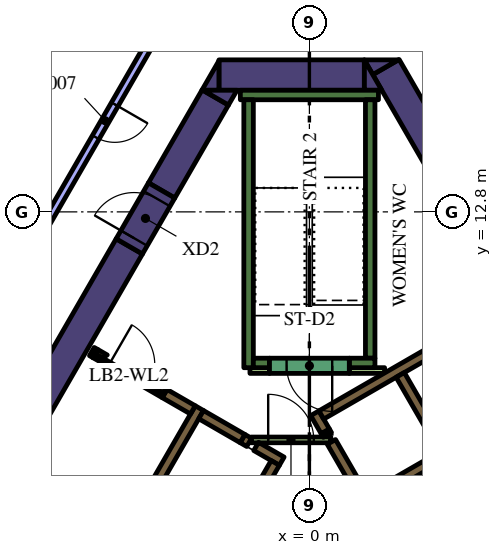
"""IFC4 building model, lengths in metres.
Left out: names, types, materials, properties, quantities, classifications, styles, units other than length and angle.
Written with IfcOpenShell. Run it as: python <this file> out.ifc"""

import sys

from ifc_helpers import new_model, si_unit, direction, frame, frame_2d, origin, place, context, subcontext, project, spatial, polyline, rectangle, outline, extrude, element, fill, save


model = new_model("IFC4")
c1 = context("Model", 3, precision=1e-05, world=origin(), true_north=direction((0.0, 1.0)))
c2 = subcontext(c1, "Body", "Model", "MODEL_VIEW")
j1 = project(units=[si_unit("LENGTHUNIT", "METRE"), si_unit("PLANEANGLEUNIT", "RADIAN")], contexts=[c1])
p1 = place(None, origin())
s1 = spatial("IfcSite", under=j1, at=p1, CompositionType="ELEMENT")
p2 = place(p1, origin())
s2 = spatial("IfcBuilding", under=s1, at=p2, CompositionType="ELEMENT")
p3 = place(p2, frame((0.0, 0.0, 179.4)))
s3 = spatial("IfcBuildingStorey", under=s2, at=p3, CompositionType="ELEMENT", Elevation=179.4)
p4 = place(p3, frame((5.549, 10.489, 0.0), z_axis=(0.0, 0.0, 1.0), x_axis=(-0.50001746176, 0.866015321998, 0.0)))
e1 = element("IfcWall", 1, at=p4, inside=s3, PredefinedType="SOLIDWALL", context=c2, shape_type="SweptSolid", body=[
    extrude(rectangle(XDim=7.068, YDim=0.8, at=frame_2d((3.534, 0.0))), origin(), (0.0, 0.0, 1.0), 4.2),
])
p5 = place(p3, origin())
e2 = element("IfcWall", 2, at=p5, inside=s3, PredefinedType="SOLIDWALL", context=c2, shape_type="SweptSolid", body=[
    extrude(outline(polyline([(1.443, 16.8), (2.339, 16.8), (1.667, 16.412), (1.443, 16.8)])), origin(), (0.0, 0.0, 1.0), 4.2),
])
p6 = place(p3, frame((-2.379, 16.4, 0.0), z_axis=(0.0, 0.0, 1.0), x_axis=(1.0, 0.0, 0.0)))
e3 = element("IfcWall", 3, at=p6, inside=s3, PredefinedType="SOLIDWALL", context=c2, shape_type="SweptSolid", body=[
    extrude(rectangle(XDim=3.824, YDim=0.8, at=frame_2d((1.912, 0.0))), origin(), (0.0, 0.0, 1.0), 4.2),
])
e4 = element("IfcWall", 4, at=p5, inside=s3, PredefinedType="SOLIDWALL", context=c2, shape_type="SweptSolid", body=[
    extrude(outline(polyline([(1.905, 16.0), (1.447, 16.0), (1.447, 16.793), (1.905, 16.0)])), origin(), (0.0, 0.0, 1.0), 4.2),
])
e5 = element("IfcWall", 5, at=p5, inside=s3, PredefinedType="SOLIDWALL", context=c2, shape_type="SweptSolid", body=[
    extrude(outline(polyline([(-2.829, 16.0), (-2.381, 16.776), (-2.381, 16.0), (-2.829, 16.0)])), origin(), (0.0, 0.0, 1.0), 4.2),
])
p7 = place(p3, frame((-2.477, 15.81, 0.0), z_axis=(0.0, 0.0, 1.0), x_axis=(-0.499969377405, -0.866043083026, 0.0)))
e6 = element("IfcWall", 6, at=p7, inside=s3, PredefinedType="SOLIDWALL", context=c2, shape_type="SweptSolid", body=[
    extrude(rectangle(XDim=2.824, YDim=0.8, at=frame_2d((1.412, 0.0))), origin(), (0.0, 0.0, 1.0), 4.2),
])
e7 = element("IfcWall", 7, at=p5, inside=s3, PredefinedType="SOLIDWALL", context=c2, shape_type="SweptSolid", body=[
    extrude(outline(polyline([(-1.905, 16.0), (-2.129, 15.612), (-2.801, 16.0), (-1.905, 16.0)])), origin(), (0.0, 0.0, 1.0), 4.2),
])
p8 = place(p3, frame((-12.668, -1.842, 0.0), z_axis=(0.0, 0.0, 1.0), x_axis=(0.500003640647, 0.866023301845, 0.0)))
e8 = element("IfcWall", 8, at=p8, inside=s3, PredefinedType="SOLIDWALL", context=c2, shape_type="SweptSolid", body=[
    extrude(rectangle(XDim=15.858, YDim=0.8, at=frame_2d((7.929, 0.0))), origin(), (0.0, 0.0, 1.0), 4.2),
])
p9 = place(p3, frame((-1.817, 15.875, 0.0), z_axis=(0.0, 0.0, 1.0), x_axis=(1.0, 0.0, 0.0)))
e9 = element("IfcWall", 9, at=p9, inside=s3, PredefinedType="SOLIDWALL", context=c2, shape_type="SweptSolid", body=[
    extrude(rectangle(XDim=3.634, YDim=0.25, at=frame_2d((1.817, 0.0))), origin(), (0.0, 0.0, 1.0), 4.2),
])
p10 = place(p3, frame((1.6, 8.95, 0.0), z_axis=(0.0, 0.0, 1.0), x_axis=(0.0, 1.0, 0.0)))
e10 = element("IfcWall", 10, at=p10, inside=s3, PredefinedType="SOLIDWALL", context=c2, shape_type="SweptSolid", body=[
    extrude(rectangle(XDim=6.8, YDim=0.25, at=frame_2d((3.4, 0.0))), origin(), (0.0, 0.0, 1.0), 4.2),
])
p11 = place(p3, frame((1.05, 8.825, 0.0), z_axis=(0.0, 0.0, 1.0), x_axis=(1.0, 0.0, 0.0)))
e11 = element("IfcWall", 11, at=p11, inside=s3, PredefinedType="SOLIDWALL", context=c2, shape_type="SweptSolid", body=[
    extrude(rectangle(XDim=0.675, YDim=0.25, at=frame_2d((0.337, 0.0))), origin(), (0.0, 0.0, 1.0), 4.2),
])
p12 = place(p3, frame((-1.6, 8.7, 0.0), z_axis=(0.0, 0.0, 1.0), x_axis=(0.0, 1.0, 0.0)))
e12 = element("IfcWall", 12, at=p12, inside=s3, PredefinedType="SOLIDWALL", context=c2, shape_type="SweptSolid", body=[
    extrude(rectangle(XDim=7.05, YDim=0.25, at=frame_2d((3.525, 0.0))), origin(), (0.0, 0.0, 1.0), 4.2),
])
p13 = place(p3, frame((-1.475, 8.825, 0.0), z_axis=(0.0, 0.0, 1.0), x_axis=(1.0, 0.0, 0.0)))
e13 = element("IfcWall", 13, at=p13, inside=s3, PredefinedType="SOLIDWALL", context=c2, shape_type="SweptSolid", body=[
    extrude(rectangle(XDim=0.425, YDim=0.25, at=frame_2d((0.212, 0.0))), origin(), (0.0, 0.0, 1.0), 4.2),
])
p14 = place(p3, frame((0.473, 6.93, 0.0), z_axis=(0.0, 0.0, 1.0), x_axis=(-0.49972245349, 0.866185586049, 0.0)))
e14 = element("IfcWall", 14, at=p14, inside=s3, PredefinedType="SOLIDWALL", context=c2, shape_type="SweptSolid", body=[
    extrude(rectangle(XDim=0.11, YDim=0.25, at=frame_2d((0.055, 0.0))), origin(), (0.0, 0.0, 1.0), 4.2),
])
p15 = place(p3, frame((6.568, -3.627, 0.0), z_axis=(0.0, 0.0, 1.0), x_axis=(-0.499999455981, 0.866025717874, 0.0)))
e15 = element("IfcWall", 15, at=p15, inside=s3, PredefinedType="SOLIDWALL", context=c2, shape_type="SweptSolid", body=[
    extrude(rectangle(XDim=11.978, YDim=0.25, at=frame_2d((5.989, 0.0))), origin(), (0.0, 0.0, 1.0), 4.2),
])
p16 = place(p3, frame((0.417, 7.027, 0.0), z_axis=(0.0, 0.0, 1.0), x_axis=(-0.500210807569, 0.865903659763, 0.0)))
e16 = element("IfcWall", 16, at=p16, inside=s3, PredefinedType="SOLIDWALL", context=c2, shape_type="SweptSolid", body=[
    extrude(rectangle(XDim=0.548, YDim=0.25, at=frame_2d((0.274, 0.0))), origin(), (0.0, 0.0, 1.0), 4.2),
])
p17 = place(p3, frame((3.647, 9.38, 0.0), z_axis=(0.0, 0.0, 1.0), x_axis=(-0.866025015791, -0.500000672024, 0.0)))
e17 = element("IfcWall", 17, at=p17, inside=s3, PredefinedType="SOLIDWALL", context=c2, shape_type="SweptSolid", body=[
    extrude(rectangle(XDim=3.849, YDim=0.25, at=frame_2d((1.924, 0.0))), origin(), (0.0, 0.0, 1.0), 4.2),
])
p18 = place(p3, frame((1.574, 5.274, 0.0), z_axis=(0.0, 0.0, 1.0), x_axis=(0.866028486751, 0.499994660107, 0.0)))
e18 = element("IfcWall", 18, at=p18, inside=s3, PredefinedType="SOLIDWALL", context=c2, shape_type="SweptSolid", body=[
    extrude(rectangle(XDim=2.2, YDim=0.25, at=frame_2d((1.1, 0.0))), origin(), (0.0, 0.0, 1.0), 4.2),
])
p19 = place(p3, frame((-8.06, -1.311, 0.0), z_axis=(0.0, 0.0, 1.0), x_axis=(0.50000273126, 0.866023826885, 0.0)))
e19 = element("IfcWall", 19, at=p19, inside=s3, PredefinedType="SOLIDWALL", context=c2, shape_type="SweptSolid", body=[
    extrude(rectangle(XDim=10.33, YDim=0.25, at=frame_2d((5.165, 0.0))), origin(), (0.0, 0.0, 1.0), 4.2),
])
p20 = place(p3, frame((-1.758, 6.835, 0.0), z_axis=(0.0, 0.0, 1.0), x_axis=(0.865982457891, -0.500074377092, 0.0)))
e20 = element("IfcWall", 20, at=p20, inside=s3, PredefinedType="SOLIDWALL", context=c2, shape_type="SweptSolid", body=[
    extrude(rectangle(XDim=0.2, YDim=0.25, at=frame_2d((0.1, 0.0))), origin(), (0.0, 0.0, 1.0), 4.2),
])
p21 = place(p3, frame((-1.76, 6.836, 0.0), z_axis=(0.0, 0.0, 1.0), x_axis=(-0.865952863304, 0.500125622755, 0.0)))
e21 = element("IfcWall", 21, at=p21, inside=s3, PredefinedType="SOLIDWALL", context=c2, shape_type="SweptSolid", body=[
    extrude(rectangle(XDim=1.258, YDim=0.25, at=frame_2d((0.629, 0.0))), origin(), (0.0, 0.0, 1.0), 4.2),
])
p22 = place(p3, frame((-0.728, 6.24, 0.0), z_axis=(0.0, 0.0, 1.0), x_axis=(-0.865955664968, 0.500120771724, 0.0)))
e22 = element("IfcWall", 22, at=p22, inside=s3, PredefinedType="SOLIDWALL", context=c2, shape_type="SweptSolid", body=[
    extrude(rectangle(XDim=0.778, YDim=0.25, at=frame_2d((0.389, 0.0))), origin(), (0.0, 0.0, 1.0), 4.2),
])
p23 = place(p3, frame((-5.725, 9.125, 0.0), z_axis=(0.0, 0.0, 1.0), x_axis=(0.866185586049, -0.49972245349, 0.0)))
e23 = element("IfcWall", 23, at=p23, inside=s3, PredefinedType="SOLIDWALL", context=c2, shape_type="SweptSolid", body=[
    extrude(rectangle(XDim=0.11, YDim=0.25, at=frame_2d((0.055, 0.0))), origin(), (0.0, 0.0, 1.0), 4.2),
])
p24 = place(p3, frame((-3.066, 7.59, 0.0), z_axis=(0.0, 0.0, 1.0), x_axis=(-0.866081358704, 0.49990307071, 0.0)))
e24 = element("IfcWall", 24, at=p24, inside=s3, PredefinedType="SOLIDWALL", context=c2, shape_type="SweptSolid", body=[
    extrude(rectangle(XDim=0.858, YDim=0.25, at=frame_2d((0.429, 0.0))), origin(), (0.0, 0.0, 1.0), 4.2),
])
e25 = element("IfcWall", 25, at=p5, inside=s3, PredefinedType="SOLIDWALL", context=c2, shape_type="SweptSolid", body=[
    extrude(outline(polyline([(-3.748, 8.128), (-3.813, 8.015), (-4.027, 8.139), (-4.017, 8.156), (-4.008, 8.173), (-4.0, 8.192), (-3.995, 8.21), (-3.991, 8.23), (-3.99, 8.25), (-3.99, 8.268), (-3.748, 8.128)])), origin(), (0.0, 0.0, 1.0), 4.2),
])
e26 = element("IfcWall", 26, at=p5, inside=s3, PredefinedType="SOLIDWALL", context=c2, shape_type="SweptSolid", body=[
    extrude(outline(polyline([(-5.689, 8.96), (-5.69, 8.961), (-5.565, 9.177), (-5.319, 9.035), (-5.335, 9.026), (-5.351, 9.015), (-5.366, 9.002), (-5.379, 8.988), (-5.392, 8.972), (-5.402, 8.956), (-5.412, 8.939), (-5.629, 9.064), (-5.629, 9.064), (-5.689, 8.96)])), origin(), (0.0, 0.0, 1.0), 4.2),
])
p25 = place(p3, frame((1.05, 8.625, 0.0), z_axis=(0.0, 0.0, 1.0), x_axis=(1.0, 0.0, 0.0)))
e27 = element("IfcWall", 27, at=p25, inside=s3, PredefinedType="PARTITIONING", context=c2, shape_type="SweptSolid", body=[
    extrude(rectangle(XDim=0.929, YDim=0.15, at=frame_2d((0.464, 0.0))), origin(), (0.0, 0.0, 1.0), 3.15),
])
p26 = place(p3, frame((-1.564, 8.625, 0.0), z_axis=(0.0, 0.0, 1.0), x_axis=(1.0, 0.0, 0.0)))
e28 = element("IfcWall", 28, at=p26, inside=s3, PredefinedType="PARTITIONING", context=c2, shape_type="SweptSolid", body=[
    extrude(rectangle(XDim=0.514, YDim=0.15, at=frame_2d((0.257, 0.0))), origin(), (0.0, 0.0, 1.0), 3.15),
])
p27 = place(p3, frame((8.565, -2.185, 0.0), z_axis=(0.0, 0.0, 1.0), x_axis=(-0.499997954832, 0.866026584559, 0.0)))
e29 = element("IfcWall", 29, at=p27, inside=s3, PredefinedType="SOLIDWALL", context=c2, shape_type="SweptSolid", body=[
    extrude(rectangle(XDim=12.35, YDim=0.25, at=frame_2d((6.175, 0.0))), origin(), (0.0, 0.0, 1.0), 4.2),
])
p28 = place(p27, frame((0.585, 0.0, 0.0)))
e30 = element("IfcOpeningElement", 30, at=p28, cuts=e29, PredefinedType="OPENING", context=c2, shape_type="SweptSolid", body=[
    extrude(rectangle(XDim=1.1, YDim=2.1, at=frame_2d((0.55, 1.05))), frame((0.0, 0.135, 0.0), z_axis=(0.0, -1.0, 0.0), x_axis=(1.0, 0.0, 0.0)), (0.0, 0.0, 1.0), 0.27),
])
p29 = place(p3, frame((-0.898, 6.194, 0.0), z_axis=(0.0, 0.0, 1.0), x_axis=(-0.499996202215, -0.866027596426, 0.0)))
e31 = element("IfcWall", 31, at=p29, inside=s3, PredefinedType="SOLIDWALL", context=c2, shape_type="SweptSolid", body=[
    extrude(rectangle(XDim=9.83, YDim=0.25, at=frame_2d((4.915, 0.0))), origin(), (0.0, 0.0, 1.0), 4.2),
])
p30 = place(p29, frame((0.585, 0.0, 0.0)))
e32 = element("IfcOpeningElement", 32, at=p30, cuts=e31, PredefinedType="OPENING", context=c2, shape_type="SweptSolid", body=[
    extrude(rectangle(XDim=1.1, YDim=2.1, at=frame_2d((0.55, 1.05))), frame((0.0, 0.135, 0.0), z_axis=(0.0, -1.0, 0.0), x_axis=(1.0, 0.0, 0.0)), (0.0, 0.0, 1.0), 0.27),
])
p31 = place(p29, frame((3.105, 0.0, 0.0)))
e33 = element("IfcOpeningElement", 33, at=p31, cuts=e31, PredefinedType="OPENING", context=c2, shape_type="SweptSolid", body=[
    extrude(rectangle(XDim=1.1, YDim=2.1, at=frame_2d((0.55, 1.05))), frame((0.0, 0.135, 0.0), z_axis=(0.0, -1.0, 0.0), x_axis=(1.0, 0.0, 0.0)), (0.0, 0.0, 1.0), 0.27),
])
p32 = place(p29, frame((5.625, 0.0, 0.0)))
e34 = element("IfcOpeningElement", 34, at=p32, cuts=e31, PredefinedType="OPENING", context=c2, shape_type="SweptSolid", body=[
    extrude(rectangle(XDim=1.1, YDim=2.1, at=frame_2d((0.55, 1.05))), frame((0.0, 0.135, 0.0), z_axis=(0.0, -1.0, 0.0), x_axis=(1.0, 0.0, 0.0)), (0.0, 0.0, 1.0), 0.27),
])
p33 = place(p29, frame((8.145, 0.0, 0.0)))
e35 = element("IfcOpeningElement", 35, at=p33, cuts=e31, PredefinedType="OPENING", context=c2, shape_type="SweptSolid", body=[
    extrude(rectangle(XDim=1.1, YDim=2.1, at=frame_2d((0.55, 1.05))), frame((0.0, 0.135, 0.0), z_axis=(0.0, -1.0, 0.0), x_axis=(1.0, 0.0, 0.0)), (0.0, 0.0, 1.0), 0.27),
])
p34 = place(p3, frame((1.05, 8.75, 0.0), z_axis=(0.0, 0.0, 1.0), x_axis=(-1.0, 0.0, 0.0)))
e36 = element("IfcWall", 36, at=p34, inside=s3, PredefinedType="SOLIDWALL", context=c2, shape_type="SweptSolid", body=[
    extrude(rectangle(XDim=2.1, YDim=0.4, at=frame_2d((1.05, 0.0))), origin(), (0.0, 0.0, 1.0), 4.2),
])
p35 = place(p34, frame((0.45, 0.0, 0.0)))
e37 = element("IfcOpeningElement", 37, at=p35, cuts=e36, PredefinedType="OPENING", context=c2, shape_type="SweptSolid", body=[
    extrude(rectangle(XDim=1.2, YDim=2.1, at=frame_2d((0.6, 1.05))), frame((0.0, 0.21, 0.0), z_axis=(0.0, -1.0, 0.0), x_axis=(1.0, 0.0, 0.0)), (0.0, 0.0, 1.0), 0.42),
])
p36 = place(p3, frame((-1.534, 6.8, 0.0), z_axis=(0.0, 0.0, 1.0), x_axis=(1.0, 0.0, 0.0)))
e38 = element("IfcWall", 38, at=p36, inside=s3, PredefinedType="PARTITIONING", context=c2, shape_type="SweptSolid", body=[
    extrude(rectangle(XDim=2.1, YDim=0.15, at=frame_2d((1.05, 0.0))), origin(), (0.0, 0.0, 1.0), 3.15),
])
p37 = place(p36, frame((0.45, 0.0, 0.0)))
e39 = element("IfcOpeningElement", 39, at=p37, cuts=e38, PredefinedType="OPENING", context=c2, shape_type="SweptSolid", body=[
    extrude(rectangle(XDim=1.2, YDim=2.1, at=frame_2d((0.6, 1.05))), frame((0.0, 0.085, 0.0), z_axis=(0.0, -1.0, 0.0), x_axis=(1.0, 0.0, 0.0)), (0.0, 0.0, 1.0), 0.17),
])
p38 = place(p3, frame((-5.659, 9.012, 0.0), z_axis=(0.0, 0.0, 1.0), x_axis=(0.866009402589, -0.500027713859, 0.0)))
e40 = element("IfcWall", 40, at=p38, inside=s3, PredefinedType="PARTITIONING", context=c2, shape_type="SweptSolid", body=[
    extrude(rectangle(XDim=2.1, YDim=0.12, at=frame_2d((1.05, 0.0))), origin(), (0.0, 0.0, 1.0), 3.15),
])
p39 = place(p38, frame((0.45, 0.0, 0.0)))
e41 = element("IfcOpeningElement", 41, at=p39, cuts=e40, PredefinedType="OPENING", context=c2, shape_type="SweptSolid", body=[
    extrude(rectangle(XDim=1.2, YDim=2.1, at=frame_2d((0.6, 1.05))), frame((0.0, 0.07, 0.0), z_axis=(0.0, -1.0, 0.0), x_axis=(1.0, 0.0, 0.0)), (0.0, 0.0, 1.0), 0.14),
])
p40 = place(p3, frame((-4.739, 11.892, 0.0), z_axis=(0.0, 0.0, 1.0), x_axis=(0.500062241894, 0.865989465428, 0.0)))
e42 = element("IfcWall", 42, at=p40, inside=s3, PredefinedType="SOLIDWALL", context=c2, shape_type="SweptSolid", body=[
    extrude(rectangle(XDim=1.7, YDim=0.8, at=frame_2d((0.85, 0.0))), origin(), (0.0, 0.0, 1.0), 4.2),
])
p41 = place(p40, frame((0.25, 0.0, 0.0)))
e43 = element("IfcOpeningElement", 43, at=p41, cuts=e42, PredefinedType="OPENING", context=c2, shape_type="SweptSolid", body=[
    extrude(rectangle(XDim=1.2, YDim=2.1, at=frame_2d((0.6, 1.05))), frame((0.0, 0.41, 0.0), z_axis=(0.0, -1.0, 0.0), x_axis=(1.0, 0.0, 0.0)), (0.0, 0.0, 1.0), 0.82),
])
p42 = place(p3, frame((-3.421, 18.574, 0.0), z_axis=(0.0, 0.0, 1.0), x_axis=(-0.499989434416, -0.866031503741, 0.0)))
e44 = element("IfcWall", 44, at=p42, inside=s3, PredefinedType="PARTITIONING", context=c2, shape_type="SweptSolid", body=[
    extrude(rectangle(XDim=7.863, YDim=0.2, at=frame_2d((3.932, 0.0))), origin(), (0.0, 0.0, 1.0), 3.15),
])
p43 = place(p42, frame((3.4, 0.0, 0.0)))
e45 = element("IfcOpeningElement", 45, at=p43, cuts=e44, PredefinedType="OPENING", context=c2, shape_type="SweptSolid", body=[
    extrude(rectangle(XDim=1.0, YDim=2.1, at=frame_2d((0.5, 1.05))), frame((0.0, 0.11, 0.0), z_axis=(0.0, -1.0, 0.0), x_axis=(1.0, 0.0, 0.0)), (0.0, 0.0, 1.0), 0.22),
])
p44 = place(p35, origin())
e46 = element("IfcDoor", 46, at=p44, inside=s3, OperationType="SINGLE_SWING_LEFT", PredefinedType="DOOR", context=c2, shape_type="SweptSolid", body=[
    extrude(rectangle(XDim=1.2, YDim=2.1, at=frame_2d((0.6, 1.05))), frame((0.0, 0.025, 0.0), z_axis=(0.0, -1.0, 0.0), x_axis=(1.0, 0.0, 0.0)), (0.0, 0.0, 1.0), 0.05),
])
fill(e37, e46)
p45 = place(p37, origin())
e47 = element("IfcDoor", 47, at=p45, inside=s3, OperationType="SINGLE_SWING_LEFT", PredefinedType="DOOR", context=c2, shape_type="SweptSolid", body=[
    extrude(rectangle(XDim=1.2, YDim=2.1, at=frame_2d((0.6, 1.05))), frame((0.0, 0.025, 0.0), z_axis=(0.0, -1.0, 0.0), x_axis=(1.0, 0.0, 0.0)), (0.0, 0.0, 1.0), 0.05),
])
fill(e39, e47)
p46 = place(p39, origin())
e48 = element("IfcDoor", 48, at=p46, inside=s3, OperationType="SINGLE_SWING_LEFT", PredefinedType="DOOR", context=c2, shape_type="SweptSolid", body=[
    extrude(rectangle(XDim=1.2, YDim=2.1, at=frame_2d((0.6, 1.05))), frame((0.0, 0.025, 0.0), z_axis=(0.0, -1.0, 0.0), x_axis=(1.0, 0.0, 0.0)), (0.0, 0.0, 1.0), 0.05),
])
fill(e41, e48)
p47 = place(p41, origin())
e49 = element("IfcDoor", 49, at=p47, inside=s3, OperationType="SINGLE_SWING_LEFT", PredefinedType="DOOR", context=c2, shape_type="SweptSolid", body=[
    extrude(rectangle(XDim=1.2, YDim=2.1, at=frame_2d((0.6, 1.05))), frame((0.0, 0.025, 0.0), z_axis=(0.0, -1.0, 0.0), x_axis=(1.0, 0.0, 0.0)), (0.0, 0.0, 1.0), 0.05),
])
fill(e43, e49)
p48 = place(p43, origin())
e50 = element("IfcDoor", 50, at=p48, inside=s3, OperationType="SINGLE_SWING_LEFT", PredefinedType="DOOR", context=c2, shape_type="SweptSolid", body=[
    extrude(rectangle(XDim=1.0, YDim=2.1, at=frame_2d((0.5, 1.05))), frame((0.0, 0.025, 0.0), z_axis=(0.0, -1.0, 0.0), x_axis=(1.0, 0.0, 0.0)), (0.0, 0.0, 1.0), 0.05),
])
fill(e45, e50)
save(model, sys.argv[1])
